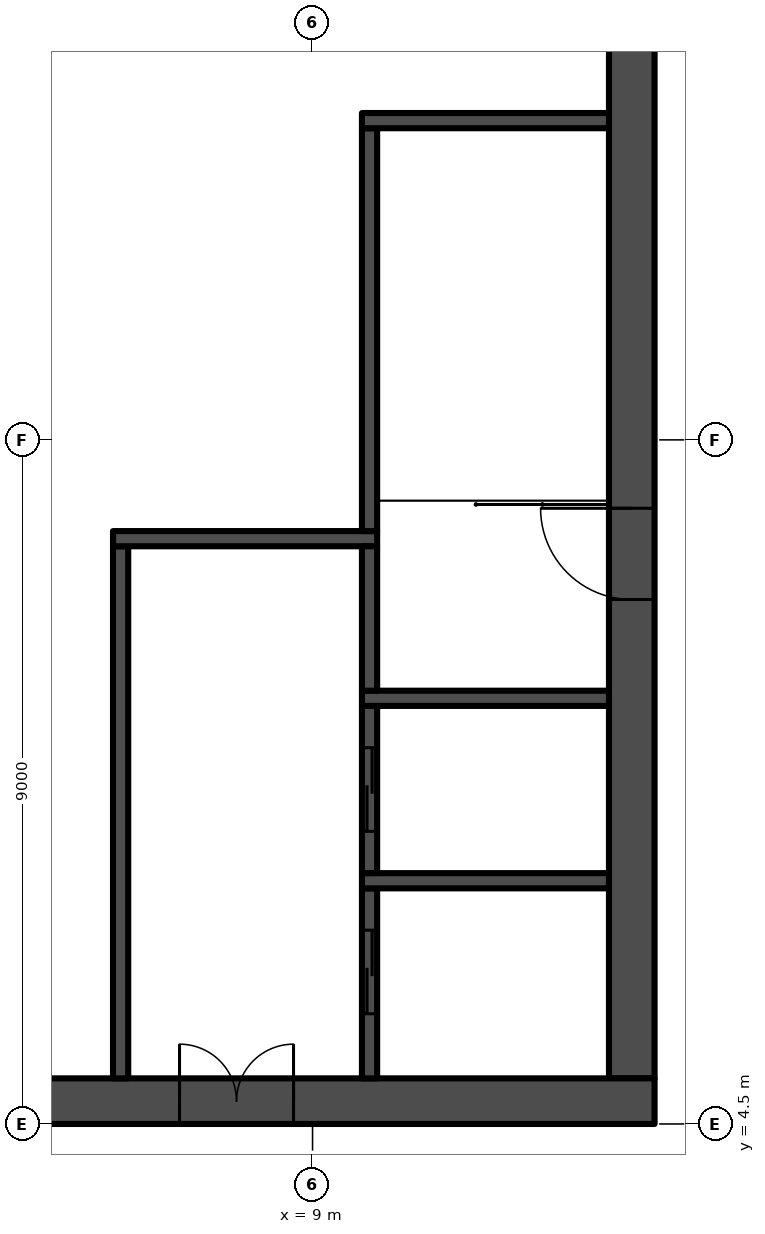
"""IFC4 building model, lengths in metres.
Left out: names, types, materials, properties, quantities, classifications, styles, units other than length and angle.
Written with IfcOpenShell. Run it as: python <this file> out.ifc"""

import sys

from ifc_helpers import new_model, si_unit, direction, frame, frame_2d, origin, place, context, subcontext, project, spatial, rectangle, extrude, element, fill, save


model = new_model("IFC4")
c1 = context("Model", 3, precision=1e-05, world=origin(), true_north=direction((0.0, 1.0)))
c2 = subcontext(c1, "Body", "Model", "MODEL_VIEW")
j1 = project(units=[si_unit("LENGTHUNIT", "METRE"), si_unit("PLANEANGLEUNIT", "RADIAN")], contexts=[c1])
p1 = place(None, origin())
s1 = spatial("IfcSite", under=j1, at=p1, CompositionType="ELEMENT")
p2 = place(p1, origin())
s2 = spatial("IfcBuilding", under=s1, at=p2, CompositionType="ELEMENT")
p3 = place(p2, frame((0.0, 0.0, 303.4)))
s3 = spatial("IfcBuildingStorey", under=s2, at=p3, CompositionType="ELEMENT", Elevation=303.4)
p4 = place(p3, frame((-13.5, 4.8, -0.35), z_axis=(0.0, 0.0, 1.0), x_axis=(1.0, 0.0, 0.0)))
e1 = element("IfcWall", 1, at=p4, inside=s3, PredefinedType="SHEAR", context=c2, shape_type="SweptSolid", body=[
    extrude(rectangle(XDim=27.0, YDim=0.6, at=frame_2d((13.5, 0.0))), origin(), (0.0, 0.0, 1.0), 9.35),
])
p5 = place(p4, frame((4.9, 0.0, 0.35)))
e2 = element("IfcOpeningElement", 2, at=p5, cuts=e1, PredefinedType="OPENING", context=c2, shape_type="SweptSolid", body=[
    extrude(rectangle(XDim=1.2, YDim=2.2, at=frame_2d((0.6, 1.1))), frame((0.0, 0.31, 0.0), z_axis=(0.0, -1.0, 0.0), x_axis=(1.0, 0.0, 0.0)), (0.0, 0.0, 1.0), 0.62),
])
p6 = place(p4, frame((20.75, 0.0, 0.35)))
e3 = element("IfcOpeningElement", 3, at=p6, cuts=e1, PredefinedType="OPENING", context=c2, shape_type="SweptSolid", body=[
    extrude(rectangle(XDim=1.5, YDim=2.2, at=frame_2d((0.75, 1.1))), frame((0.0, 0.31, 0.0), z_axis=(0.0, -1.0, 0.0), x_axis=(1.0, 0.0, 0.0)), (0.0, 0.0, 1.0), 0.62),
])
p7 = place(p3, frame((13.2, 5.1, -0.35), z_axis=(0.0, 0.0, 1.0), x_axis=(0.0, 1.0, 0.0)))
e4 = element("IfcWall", 4, at=p7, inside=s3, PredefinedType="SHEAR", context=c2, shape_type="SweptSolid", body=[
    extrude(rectangle(XDim=16.8, YDim=0.6, at=frame_2d((8.4, 0.0))), origin(), (0.0, 0.0, 1.0), 9.35),
])
p8 = place(p7, frame((6.3, 0.0, 0.35)))
e5 = element("IfcOpeningElement", 5, at=p8, cuts=e4, PredefinedType="OPENING", context=c2, shape_type="SweptSolid", body=[
    extrude(rectangle(XDim=1.2, YDim=2.2, at=frame_2d((0.6, 1.1))), frame((0.0, 0.31, 0.0), z_axis=(0.0, -1.0, 0.0), x_axis=(1.0, 0.0, 0.0)), (0.0, 0.0, 1.0), 0.62),
])
p9 = place(p3, frame((6.475, 5.1, 0.0), z_axis=(0.0, 0.0, 1.0), x_axis=(0.0, 1.0, 0.0)))
e6 = element("IfcWall", 6, at=p9, inside=s3, PredefinedType="SHEAR", context=c2, shape_type="SweptSolid", body=[
    extrude(rectangle(XDim=7.0, YDim=0.2, at=frame_2d((3.5, 0.0))), origin(), (0.0, 0.0, 1.0), 4.6),
])
p10 = place(p3, frame((6.375, 12.2, 0.0), z_axis=(0.0, 0.0, 1.0), x_axis=(1.0, 0.0, 0.0)))
e7 = element("IfcWall", 7, at=p10, inside=s3, PredefinedType="SHEAR", context=c2, shape_type="SweptSolid", body=[
    extrude(rectangle(XDim=3.475, YDim=0.2, at=frame_2d((1.738, 0.0))), origin(), (0.0, 0.0, 1.0), 4.6),
])
p11 = place(p3, frame((9.75, 5.1, 0.0), z_axis=(0.0, 0.0, 1.0), x_axis=(0.0, 1.0, 0.0)))
e8 = element("IfcWall", 8, at=p11, inside=s3, PredefinedType="SHEAR", context=c2, shape_type="SweptSolid", body=[
    extrude(rectangle(XDim=2.5, YDim=0.2, at=frame_2d((1.25, 0.0))), origin(), (0.0, 0.0, 1.0), 4.6),
])
p12 = place(p11, frame((0.85, 0.0, 0.0)))
e9 = element("IfcOpeningElement", 9, at=p12, cuts=e8, PredefinedType="OPENING", context=c2, shape_type="SweptSolid", body=[
    extrude(rectangle(XDim=1.1, YDim=2.1, at=frame_2d((0.55, 1.05))), frame((0.0, 0.11, 0.0), z_axis=(0.0, -1.0, 0.0), x_axis=(1.0, 0.0, 0.0)), (0.0, 0.0, 1.0), 0.22),
])
p13 = place(p3, frame((9.65, 7.7, 0.0), z_axis=(0.0, 0.0, 1.0), x_axis=(1.0, 0.0, 0.0)))
e10 = element("IfcWall", 10, at=p13, inside=s3, PredefinedType="SHEAR", context=c2, shape_type="SweptSolid", body=[
    extrude(rectangle(XDim=3.25, YDim=0.2, at=frame_2d((1.625, 0.0))), origin(), (0.0, 0.0, 1.0), 4.6),
])
p14 = place(p3, frame((9.75, 7.8, 0.0), z_axis=(0.0, 0.0, 1.0), x_axis=(0.0, 1.0, 0.0)))
e11 = element("IfcWall", 11, at=p14, inside=s3, PredefinedType="SHEAR", context=c2, shape_type="SweptSolid", body=[
    extrude(rectangle(XDim=2.2, YDim=0.2, at=frame_2d((1.1, 0.0))), origin(), (0.0, 0.0, 1.0), 4.6),
])
p15 = place(p14, frame((0.55, 0.0, 0.0)))
e12 = element("IfcOpeningElement", 12, at=p15, cuts=e11, PredefinedType="OPENING", context=c2, shape_type="SweptSolid", body=[
    extrude(rectangle(XDim=1.1, YDim=2.1, at=frame_2d((0.55, 1.05))), frame((0.0, 0.11, 0.0), z_axis=(0.0, -1.0, 0.0), x_axis=(1.0, 0.0, 0.0)), (0.0, 0.0, 1.0), 0.22),
])
p16 = place(p3, frame((9.65, 10.1, 0.0), z_axis=(0.0, 0.0, 1.0), x_axis=(1.0, 0.0, 0.0)))
e13 = element("IfcWall", 13, at=p16, inside=s3, PredefinedType="SHEAR", context=c2, shape_type="SweptSolid", body=[
    extrude(rectangle(XDim=3.25, YDim=0.2, at=frame_2d((1.625, 0.0))), origin(), (0.0, 0.0, 1.0), 4.6),
])
p17 = place(p3, frame((9.75, 10.2, 0.0), z_axis=(0.0, 0.0, 1.0), x_axis=(0.0, 1.0, 0.0)))
e14 = element("IfcWall", 14, at=p17, inside=s3, PredefinedType="SHEAR", context=c2, shape_type="SweptSolid", body=[
    extrude(rectangle(XDim=1.9, YDim=0.2, at=frame_2d((0.95, 0.0))), origin(), (0.0, 0.0, 1.0), 4.6),
])
p18 = place(p3, frame((9.75, 12.3, 0.0), z_axis=(0.0, 0.0, 1.0), x_axis=(0.0, 1.0, 0.0)))
e15 = element("IfcWall", 15, at=p18, inside=s3, PredefinedType="SHEAR", context=c2, shape_type="SweptSolid", body=[
    extrude(rectangle(XDim=5.3, YDim=0.2, at=frame_2d((2.65, 0.0))), origin(), (0.0, 0.0, 1.0), 3.2),
])
p19 = place(p3, frame((9.65, 17.7, 0.0), z_axis=(0.0, 0.0, 1.0), x_axis=(1.0, 0.0, 0.0)))
e16 = element("IfcWall", 16, at=p19, inside=s3, PredefinedType="SHEAR", context=c2, shape_type="SweptSolid", body=[
    extrude(rectangle(XDim=3.25, YDim=0.2, at=frame_2d((1.625, 0.0))), origin(), (0.0, 0.0, 1.0), 3.2),
])
p20 = place(p8, frame((1.2, 0.0, 0.0), z_axis=(0.0, 0.0, 1.0), x_axis=(-1.0, 0.0, 0.0)))
e17 = element("IfcDoor", 17, at=p20, inside=s3, OperationType="SINGLE_SWING_LEFT", PredefinedType="DOOR", context=c2, shape_type="SweptSolid", body=[
    extrude(rectangle(XDim=1.2, YDim=2.2, at=frame_2d((0.6, 1.1))), frame((0.0, 0.025, 0.0), z_axis=(0.0, -1.0, 0.0), x_axis=(1.0, 0.0, 0.0)), (0.0, 0.0, 1.0), 0.05),
])
fill(e5, e17)
p21 = place(p6, frame((1.5, 0.0, 0.0), z_axis=(0.0, 0.0, 1.0), x_axis=(-1.0, 0.0, 0.0)))
e18 = element("IfcDoor", 18, at=p21, inside=s3, OperationType="DOUBLE_DOOR_SINGLE_SWING", PredefinedType="DOOR", context=c2, shape_type="SweptSolid", body=[
    extrude(rectangle(XDim=1.5, YDim=2.2, at=frame_2d((0.75, 1.1))), frame((0.0, 0.025, 0.0), z_axis=(0.0, -1.0, 0.0), x_axis=(1.0, 0.0, 0.0)), (0.0, 0.0, 1.0), 0.05),
])
fill(e3, e18)
p22 = place(p12, origin())
e19 = element("IfcDoor", 19, at=p22, inside=s3, OperationType="SLIDING_TO_RIGHT", PredefinedType="DOOR", context=c2, shape_type="SweptSolid", body=[
    extrude(rectangle(XDim=1.1, YDim=2.1, at=frame_2d((0.55, 1.05))), frame((0.0, 0.025, 0.0), z_axis=(0.0, -1.0, 0.0), x_axis=(1.0, 0.0, 0.0)), (0.0, 0.0, 1.0), 0.05),
])
fill(e9, e19)
p23 = place(p15, origin())
e20 = element("IfcDoor", 20, at=p23, inside=s3, OperationType="SLIDING_TO_RIGHT", PredefinedType="DOOR", context=c2, shape_type="SweptSolid", body=[
    extrude(rectangle(XDim=1.1, YDim=2.1, at=frame_2d((0.55, 1.05))), frame((0.0, 0.025, 0.0), z_axis=(0.0, -1.0, 0.0), x_axis=(1.0, 0.0, 0.0)), (0.0, 0.0, 1.0), 0.05),
])
fill(e12, e20)
save(model, sys.argv[1])
